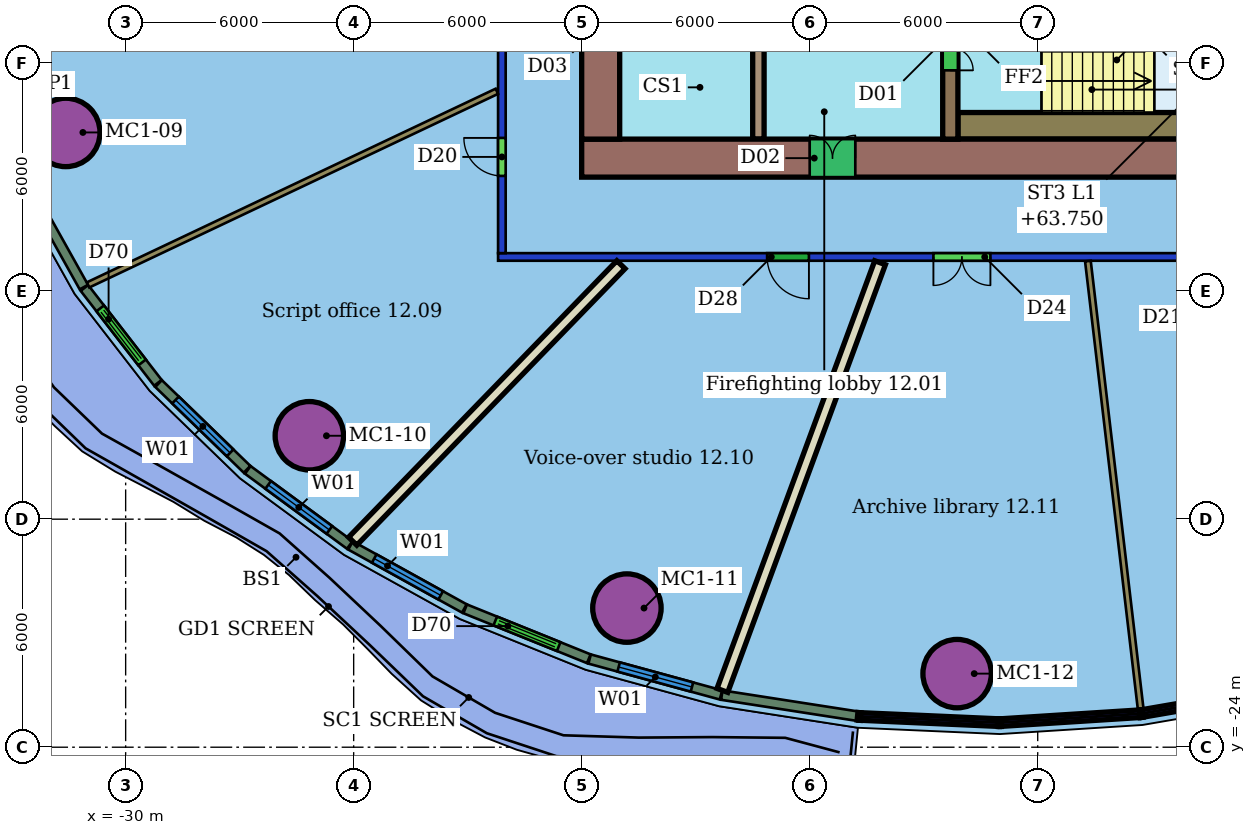
"""IFC4 building model, lengths in metres.
Left out: names, types, materials, properties, quantities, classifications, styles, units other than length and angle.
Written with IfcOpenShell. Run it as: python <this file> out.ifc"""

import sys

from ifc_helpers import new_model, si_unit, direction, frame, frame_2d, origin, origin_2d, place, context, subcontext, project, spatial, rectangle, hollow_circle, extrude, element, fill, save


model = new_model("IFC4")
c1 = context("Model", 3, precision=1e-05, world=origin(), true_north=direction((0.0, 1.0)))
c2 = subcontext(c1, "Body", "Model", "MODEL_VIEW")
j1 = project(units=[si_unit("LENGTHUNIT", "METRE"), si_unit("PLANEANGLEUNIT", "RADIAN")], contexts=[c1])
p1 = place(None, origin())
s1 = spatial("IfcSite", under=j1, at=p1, CompositionType="ELEMENT")
p2 = place(p1, origin())
s2 = spatial("IfcBuilding", under=s1, at=p2, CompositionType="ELEMENT")
p3 = place(p2, frame((0.0, 0.0, 61.9)))
s3 = spatial("IfcBuildingStorey", under=s2, at=p3, CompositionType="ELEMENT", Elevation=61.9)
for number, where, z_axis, x_axis in (
    (1, (-31.575, -7.824, 0.0), (0.0, 0.0, 1.0), (1.0, 0.0, 0.0)),
    (2, (-25.166, -15.805, 0.0), (0.0, 0.0, 1.0), (1.0, 0.0, 0.0)),
    (3, (-16.81, -20.339, 0.0), (0.0, 0.0, 1.0), (1.0, 0.0, 0.0)),
    (4, (-8.121, -22.064, 0.0), (0.0, 0.0, 1.0), (1.0, 0.0, 0.0)),
):
    element("IfcColumn", number, at=place(p3, frame(where, z_axis=z_axis, x_axis=x_axis)), inside=s3, PredefinedType="COLUMN", context=c2, shape_type="SweptSolid", body=[
        extrude(hollow_circle(Radius=0.9, WallThickness=0.06, at=origin_2d()), origin(), (0.0, 0.0, 1.0), 3.55),
    ])
p4 = place(p3, frame((8.2, -11.1, 0.0), z_axis=(0.0, 0.0, 1.0), x_axis=(-1.0, 0.0, 0.0)))
e5 = element("IfcWall", 5, at=p4, inside=s3, PredefinedType="PARTITIONING", context=c2, shape_type="SweptSolid", body=[
    extrude(rectangle(XDim=28.4, YDim=0.2, at=frame_2d((14.2, 0.0))), origin(), (0.0, 0.0, 1.0), 2.85),
])
p5 = place(p4, frame((20.22, 0.0, 0.0)))
e6 = element("IfcOpeningElement", 6, at=p5, cuts=e5, PredefinedType="OPENING", context=c2, shape_type="SweptSolid", body=[
    extrude(rectangle(XDim=1.1, YDim=2.1, at=frame_2d((0.55, 1.05))), frame((0.0, 0.11, 0.0), z_axis=(0.0, -1.0, 0.0), x_axis=(1.0, 0.0, 0.0)), (0.0, 0.0, 1.0), 0.22),
])
p6 = place(p4, frame((15.445, 0.0, 0.0)))
e7 = element("IfcOpeningElement", 7, at=p6, cuts=e5, PredefinedType="OPENING", context=c2, shape_type="SweptSolid", body=[
    extrude(rectangle(XDim=1.5, YDim=2.1, at=frame_2d((0.75, 1.05))), frame((0.0, 0.11, 0.0), z_axis=(0.0, -1.0, 0.0), x_axis=(1.0, 0.0, 0.0)), (0.0, 0.0, 1.0), 0.22),
])
p7 = place(p4, frame((7.586, 0.0, 0.0)))
e8 = element("IfcOpeningElement", 8, at=p7, cuts=e5, PredefinedType="OPENING", context=c2, shape_type="SweptSolid", body=[
    extrude(rectangle(XDim=1.8, YDim=2.1, at=frame_2d((0.9, 1.05))), frame((0.0, 0.11, 0.0), z_axis=(0.0, -1.0, 0.0), x_axis=(1.0, 0.0, 0.0)), (0.0, 0.0, 1.0), 0.22),
])
p8 = place(p3, frame((-20.1, -11.0, 0.0), z_axis=(0.0, 0.0, 1.0), x_axis=(0.0, 1.0, 0.0)))
e9 = element("IfcWall", 9, at=p8, inside=s3, PredefinedType="PARTITIONING", context=c2, shape_type="SweptSolid", body=[
    extrude(rectangle(XDim=22.0, YDim=0.2, at=frame_2d((11.0, 0.0))), origin(), (0.0, 0.0, 1.0), 2.85),
])
p9 = place(p8, frame((17.605, 0.0, 0.0)))
e10 = element("IfcOpeningElement", 10, at=p9, cuts=e9, PredefinedType="OPENING", context=c2, shape_type="SweptSolid", body=[
    extrude(rectangle(XDim=0.9, YDim=2.1, at=frame_2d((0.45, 1.05))), frame((0.0, 0.11, 0.0), z_axis=(0.0, -1.0, 0.0), x_axis=(1.0, 0.0, 0.0)), (0.0, 0.0, 1.0), 0.22),
])
p10 = place(p8, frame((13.3, 0.0, 0.0)))
e11 = element("IfcOpeningElement", 11, at=p10, cuts=e9, PredefinedType="OPENING", context=c2, shape_type="SweptSolid", body=[
    extrude(rectangle(XDim=1.1, YDim=2.1, at=frame_2d((0.55, 1.05))), frame((0.0, 0.11, 0.0), z_axis=(0.0, -1.0, 0.0), x_axis=(1.0, 0.0, 0.0)), (0.0, 0.0, 1.0), 0.22),
])
p11 = place(p8, frame((6.177, 0.0, 0.0)))
e12 = element("IfcOpeningElement", 12, at=p11, cuts=e9, PredefinedType="OPENING", context=c2, shape_type="SweptSolid", body=[
    extrude(rectangle(XDim=0.9, YDim=2.1, at=frame_2d((0.45, 1.05))), frame((0.0, 0.11, 0.0), z_axis=(0.0, -1.0, 0.0), x_axis=(1.0, 0.0, 0.0)), (0.0, 0.0, 1.0), 0.22),
])
p12 = place(p8, frame((2.032, 0.0, 0.0)))
e13 = element("IfcOpeningElement", 13, at=p12, cuts=e9, PredefinedType="OPENING", context=c2, shape_type="SweptSolid", body=[
    extrude(rectangle(XDim=1.0, YDim=2.1, at=frame_2d((0.5, 1.05))), frame((0.0, 0.11, 0.0), z_axis=(0.0, -1.0, 0.0), x_axis=(1.0, 0.0, 0.0)), (0.0, 0.0, 1.0), 0.22),
])
p13 = place(p3, frame((-30.989, -11.836, 0.0), z_axis=(0.0, 0.0, 1.0), x_axis=(0.903749950704, 0.428060774427, 0.0)))
e14 = element("IfcWall", 14, at=p13, inside=s3, PredefinedType="PARTITIONING", context=c2, shape_type="SweptSolid", body=[
    extrude(rectangle(XDim=11.902, YDim=0.15, at=frame_2d((5.951, 0.0))), origin(), (0.0, 0.0, 1.0), 3.55),
])
p14 = place(p3, frame((-24.025, -18.58, 0.0), z_axis=(0.0, 0.0, 1.0), x_axis=(0.696307194709, 0.717743889278, 0.0)))
e15 = element("IfcWall", 15, at=p14, inside=s3, PredefinedType="PARTITIONING", context=c2, shape_type="SweptSolid", body=[
    extrude(rectangle(XDim=10.136, YDim=0.3, at=frame_2d((5.068, 0.0))), origin(), (0.0, 0.0, 1.0), 3.55),
])
p15 = place(p3, frame((-14.297, -22.505, 0.0), z_axis=(0.0, 0.0, 1.0), x_axis=(0.345927029168, 0.938261419057, 0.0)))
e16 = element("IfcWall", 16, at=p15, inside=s3, PredefinedType="PARTITIONING", context=c2, shape_type="SweptSolid", body=[
    extrude(rectangle(XDim=11.994, YDim=0.3, at=frame_2d((5.997, 0.0))), origin(), (0.0, 0.0, 1.0), 3.55),
])
p16 = place(p3, frame((-3.291, -22.993, 0.0), z_axis=(0.0, 0.0, 1.0), x_axis=(-0.117014349032, 0.99313022415, 0.0)))
e17 = element("IfcWall", 17, at=p16, inside=s3, PredefinedType="PARTITIONING", context=c2, shape_type="SweptSolid", body=[
    extrude(rectangle(XDim=11.865, YDim=0.15, at=frame_2d((5.933, 0.0))), origin(), (0.0, 0.0, 1.0), 3.55),
])
p17 = place(p3, frame((-32.587, -9.234, 0.0), z_axis=(0.0, 0.0, 1.0), x_axis=(0.488205617754, -0.872728637547, 0.0)))
e18 = element("IfcWall", 18, at=p17, inside=s3, PredefinedType="SOLIDWALL", context=c2, shape_type="SweptSolid", body=[
    extrude(rectangle(XDim=3.047, YDim=0.25, at=frame_2d((1.523, 0.0))), origin(), (0.0, 0.0, 1.0), 3.15),
])
p18 = place(p3, frame((-31.085, -11.916, 0.0), z_axis=(0.0, 0.0, 1.0), x_axis=(0.612382091745, -0.790561935404, 0.0)))
e19 = element("IfcWall", 19, at=p18, inside=s3, PredefinedType="SOLIDWALL", context=c2, shape_type="SweptSolid", body=[
    extrude(rectangle(XDim=3.158, YDim=0.25, at=frame_2d((1.579, 0.0))), origin(), (0.0, 0.0, 1.0), 3.15),
])
p19 = place(p18, frame((0.679, 0.0, 0.0)))
e20 = element("IfcOpeningElement", 20, at=p19, cuts=e19, PredefinedType="OPENING", context=c2, shape_type="SweptSolid", body=[
    extrude(rectangle(XDim=1.8, YDim=2.4, at=frame_2d((0.9, 1.2))), frame((0.0, 0.135, 0.0), z_axis=(0.0, -1.0, 0.0), x_axis=(1.0, 0.0, 0.0)), (0.0, 0.0, 1.0), 0.27),
])
p20 = place(p3, frame((-29.134, -14.432, 0.0), z_axis=(0.0, 0.0, 1.0), x_axis=(0.718313139299, -0.695719939279, 0.0)))
e21 = element("IfcWall", 21, at=p20, inside=s3, PredefinedType="SOLIDWALL", context=c2, shape_type="SweptSolid", body=[
    extrude(rectangle(XDim=3.242, YDim=0.25, at=frame_2d((1.621, 0.0))), origin(), (0.0, 0.0, 1.0), 3.15),
])
p21 = place(p20, frame((0.621, 0.0, 0.8)))
e22 = element("IfcOpeningElement", 22, at=p21, cuts=e21, PredefinedType="OPENING", context=c2, shape_type="SweptSolid", body=[
    extrude(rectangle(XDim=2.0, YDim=2.2, at=frame_2d((1.0, 1.1))), frame((0.0, 0.135, 0.0), z_axis=(0.0, -1.0, 0.0), x_axis=(1.0, 0.0, 0.0)), (0.0, 0.0, 1.0), 0.27),
])
p22 = place(p3, frame((-26.786, -16.703, 0.0), z_axis=(0.0, 0.0, 1.0), x_axis=(0.80553067299, -0.592554077594, 0.0)))
e23 = element("IfcWall", 23, at=p22, inside=s3, PredefinedType="SOLIDWALL", context=c2, shape_type="SweptSolid", body=[
    extrude(rectangle(XDim=3.332, YDim=0.25, at=frame_2d((1.666, 0.0))), origin(), (0.0, 0.0, 1.0), 3.15),
])
p23 = place(p22, frame((0.666, 0.0, 0.8)))
e24 = element("IfcOpeningElement", 24, at=p23, cuts=e23, PredefinedType="OPENING", context=c2, shape_type="SweptSolid", body=[
    extrude(rectangle(XDim=2.0, YDim=2.2, at=frame_2d((1.0, 1.1))), frame((0.0, 0.135, 0.0), z_axis=(0.0, -1.0, 0.0), x_axis=(1.0, 0.0, 0.0)), (0.0, 0.0, 1.0), 0.27),
])
p24 = place(p3, frame((-24.082, -18.691, 0.0), z_axis=(0.0, 0.0, 1.0), x_axis=(0.874758800171, -0.48455860484, 0.0)))
e25 = element("IfcWall", 25, at=p24, inside=s3, PredefinedType="SOLIDWALL", context=c2, shape_type="SweptSolid", body=[
    extrude(rectangle(XDim=3.423, YDim=0.25, at=frame_2d((1.711, 0.0))), origin(), (0.0, 0.0, 1.0), 3.15),
])
p25 = place(p24, frame((0.712, 0.0, 0.8)))
e26 = element("IfcOpeningElement", 26, at=p25, cuts=e25, PredefinedType="OPENING", context=c2, shape_type="SweptSolid", body=[
    extrude(rectangle(XDim=2.0, YDim=2.2, at=frame_2d((1.0, 1.1))), frame((0.0, 0.135, 0.0), z_axis=(0.0, -1.0, 0.0), x_axis=(1.0, 0.0, 0.0)), (0.0, 0.0, 1.0), 0.27),
])
p26 = place(p3, frame((-21.066, -20.359, 0.0), z_axis=(0.0, 0.0, 1.0), x_axis=(0.927325439412, -0.374255967782, 0.0)))
e27 = element("IfcWall", 27, at=p26, inside=s3, PredefinedType="SOLIDWALL", context=c2, shape_type="SweptSolid", body=[
    extrude(rectangle(XDim=3.509, YDim=0.25, at=frame_2d((1.754, 0.0))), origin(), (0.0, 0.0, 1.0), 3.15),
])
p27 = place(p26, frame((0.854, 0.0, 0.0)))
e28 = element("IfcOpeningElement", 28, at=p27, cuts=e27, PredefinedType="OPENING", context=c2, shape_type="SweptSolid", body=[
    extrude(rectangle(XDim=1.8, YDim=2.4, at=frame_2d((0.9, 1.2))), frame((0.0, 0.135, 0.0), z_axis=(0.0, -1.0, 0.0), x_axis=(1.0, 0.0, 0.0)), (0.0, 0.0, 1.0), 0.27),
])
p28 = place(p3, frame((-17.791, -21.68, 0.0), z_axis=(0.0, 0.0, 1.0), x_axis=(0.964644250164, -0.263555441274, 0.0)))
e29 = element("IfcWall", 29, at=p28, inside=s3, PredefinedType="SOLIDWALL", context=c2, shape_type="SweptSolid", body=[
    extrude(rectangle(XDim=3.584, YDim=0.25, at=frame_2d((1.792, 0.0))), origin(), (0.0, 0.0, 1.0), 3.15),
])
p29 = place(p28, frame((0.792, 0.0, 0.8)))
e30 = element("IfcOpeningElement", 30, at=p29, cuts=e29, PredefinedType="OPENING", context=c2, shape_type="SweptSolid", body=[
    extrude(rectangle(XDim=2.0, YDim=2.2, at=frame_2d((1.0, 1.1))), frame((0.0, 0.135, 0.0), z_axis=(0.0, -1.0, 0.0), x_axis=(1.0, 0.0, 0.0)), (0.0, 0.0, 1.0), 0.27),
])
p30 = place(p3, frame((-14.312, -22.629, 0.0), z_axis=(0.0, 0.0, 1.0), x_axis=(0.98816220641, -0.153412691208, 0.0)))
e31 = element("IfcWall", 31, at=p30, inside=s3, PredefinedType="SOLIDWALL", context=c2, shape_type="SweptSolid", body=[
    extrude(rectangle(XDim=3.6, YDim=0.25, at=frame_2d((1.8, 0.0))), origin(), (0.0, 0.0, 1.0), 3.15),
])
p31 = place(p3, frame((-18.0, -8.5, 0.0), z_axis=(0.0, 0.0, 1.0), x_axis=(1.0, 0.0, 0.0)))
e32 = element("IfcWall", 32, at=p31, inside=s3, PredefinedType="SHEAR", context=c2, shape_type="SweptSolid", body=[
    extrude(rectangle(XDim=24.0, YDim=1.0, at=frame_2d((12.0, 0.0))), origin(), (0.0, 0.0, 1.0), 3.4),
])
p32 = place(p31, frame((6.0, 0.0, 0.0)))
e33 = element("IfcOpeningElement", 33, at=p32, cuts=e32, PredefinedType="OPENING", context=c2, shape_type="SweptSolid", body=[
    extrude(rectangle(XDim=1.2, YDim=2.1, at=frame_2d((0.6, 1.05))), frame((0.0, 0.51, 0.0), z_axis=(0.0, -1.0, 0.0), x_axis=(1.0, 0.0, 0.0)), (0.0, 0.0, 1.0), 1.02),
])
p33 = place(p3, frame((-17.5, 8.0, 0.0), z_axis=(0.0, 0.0, 1.0), x_axis=(0.0, -1.0, 0.0)))
e34 = element("IfcWall", 34, at=p33, inside=s3, PredefinedType="SHEAR", context=c2, shape_type="SweptSolid", body=[
    extrude(rectangle(XDim=16.0, YDim=1.0, at=frame_2d((8.0, 0.0))), origin(), (0.0, 0.0, 1.0), 3.4),
])
p34 = place(p33, frame((11.9, 0.0, 0.0)))
e35 = element("IfcOpeningElement", 35, at=p34, cuts=e34, PredefinedType="OPENING", context=c2, shape_type="SweptSolid", body=[
    extrude(rectangle(XDim=1.2, YDim=2.1, at=frame_2d((0.6, 1.05))), frame((0.0, 0.51, 0.0), z_axis=(0.0, -1.0, 0.0), x_axis=(1.0, 0.0, 0.0)), (0.0, 0.0, 1.0), 1.02),
])
p35 = place(p33, frame((2.9, 0.0, 0.0)))
e36 = element("IfcOpeningElement", 36, at=p35, cuts=e34, PredefinedType="OPENING", context=c2, shape_type="SweptSolid", body=[
    extrude(rectangle(XDim=1.2, YDim=2.1, at=frame_2d((0.6, 1.05))), frame((0.0, 0.51, 0.0), z_axis=(0.0, -1.0, 0.0), x_axis=(1.0, 0.0, 0.0)), (0.0, 0.0, 1.0), 1.02),
])
p36 = place(p3, frame((-13.35, 8.0, 0.0), z_axis=(0.0, 0.0, 1.0), x_axis=(0.0, -1.0, 0.0)))
e37 = element("IfcWall", 37, at=p36, inside=s3, PredefinedType="SHEAR", context=c2, shape_type="SweptSolid", body=[
    extrude(rectangle(XDim=16.0, YDim=0.3, at=frame_2d((8.0, 0.0))), origin(), (0.0, 0.0, 1.0), 3.4),
])
p37 = place(p36, frame((7.25, 0.0, 0.0)))
e38 = element("IfcOpeningElement", 38, at=p37, cuts=e37, PredefinedType="OPENING", context=c2, shape_type="SweptSolid", body=[
    extrude(rectangle(XDim=1.5, YDim=2.1, at=frame_2d((0.75, 1.05))), frame((0.0, 0.16, 0.0), z_axis=(0.0, -1.0, 0.0), x_axis=(1.0, 0.0, 0.0)), (0.0, 0.0, 1.0), 0.32),
])
p38 = place(p3, frame((-8.3, -3.88, 0.0), z_axis=(0.0, 0.0, 1.0), x_axis=(0.0, -1.0, 0.0)))
e39 = element("IfcWall", 39, at=p38, inside=s3, PredefinedType="SHEAR", context=c2, shape_type="SweptSolid", body=[
    extrude(rectangle(XDim=4.12, YDim=0.4, at=frame_2d((2.06, 0.0))), origin(), (0.0, 0.0, 1.0), 3.4),
])
p39 = place(p38, frame((1.11, 0.0, 0.0)))
e40 = element("IfcOpeningElement", 40, at=p39, cuts=e39, PredefinedType="OPENING", context=c2, shape_type="SweptSolid", body=[
    extrude(rectangle(XDim=1.2, YDim=2.1, at=frame_2d((0.6, 1.05))), frame((0.0, 0.21, 0.0), z_axis=(0.0, -1.0, 0.0), x_axis=(1.0, 0.0, 0.0)), (0.0, 0.0, 1.0), 0.42),
])
p40 = place(p3, frame((-8.1, -7.65, 0.0), z_axis=(0.0, 0.0, 1.0), x_axis=(1.0, 0.0, 0.0)))
e41 = element("IfcWall", 41, at=p40, inside=s3, PredefinedType="SHEAR", context=c2, shape_type="SweptSolid", body=[
    extrude(rectangle(XDim=7.05, YDim=0.7, at=frame_2d((3.525, 0.0))), origin(), (0.0, 0.0, 1.0), 3.4),
])
p41 = place(p12, origin())
e42 = element("IfcDoor", 42, at=p41, inside=s3, OperationType="SINGLE_SWING_RIGHT", PredefinedType="DOOR", context=c2, shape_type="SweptSolid", body=[
    extrude(rectangle(XDim=1.0, YDim=2.1, at=frame_2d((0.5, 1.05))), frame((0.0, 0.025, 0.0), z_axis=(0.0, -1.0, 0.0), x_axis=(1.0, 0.0, 0.0)), (0.0, 0.0, 1.0), 0.05),
])
fill(e13, e42)
p42 = place(p5, origin())
e43 = element("IfcDoor", 43, at=p42, inside=s3, OperationType="SINGLE_SWING_LEFT", PredefinedType="DOOR", context=c2, shape_type="SweptSolid", body=[
    extrude(rectangle(XDim=1.1, YDim=2.1, at=frame_2d((0.55, 1.05))), frame((0.0, 0.025, 0.0), z_axis=(0.0, -1.0, 0.0), x_axis=(1.0, 0.0, 0.0)), (0.0, 0.0, 1.0), 0.05),
])
fill(e6, e43)
p43 = place(p6, origin())
e44 = element("IfcDoor", 44, at=p43, inside=s3, OperationType="DOUBLE_DOOR_SINGLE_SWING", PredefinedType="DOOR", context=c2, shape_type="SweptSolid", body=[
    extrude(rectangle(XDim=1.5, YDim=2.1, at=frame_2d((0.75, 1.05))), frame((0.0, 0.025, 0.0), z_axis=(0.0, -1.0, 0.0), x_axis=(1.0, 0.0, 0.0)), (0.0, 0.0, 1.0), 0.05),
])
fill(e7, e44)
p44 = place(p19, origin())
e45 = element("IfcDoor", 45, at=p44, inside=s3, OperationType="DOUBLE_DOOR_SLIDING", PredefinedType="DOOR", context=c2, shape_type="SweptSolid", body=[
    extrude(rectangle(XDim=1.8, YDim=2.4, at=frame_2d((0.9, 1.2))), frame((0.0, 0.025, 0.0), z_axis=(0.0, -1.0, 0.0), x_axis=(1.0, 0.0, 0.0)), (0.0, 0.0, 1.0), 0.05),
])
fill(e20, e45)
p45 = place(p21, origin())
e46 = element("IfcWindow", 46, at=p45, inside=s3, PartitioningType="SINGLE_PANEL", PredefinedType="WINDOW", context=c2, shape_type="SweptSolid", body=[
    extrude(rectangle(XDim=2.0, YDim=2.2, at=frame_2d((1.0, 1.1))), frame((0.0, 0.03, 0.0), z_axis=(0.0, -1.0, 0.0), x_axis=(1.0, 0.0, 0.0)), (0.0, 0.0, 1.0), 0.06),
])
fill(e22, e46)
p46 = place(p23, origin())
e47 = element("IfcWindow", 47, at=p46, inside=s3, PartitioningType="SINGLE_PANEL", PredefinedType="WINDOW", context=c2, shape_type="SweptSolid", body=[
    extrude(rectangle(XDim=2.0, YDim=2.2, at=frame_2d((1.0, 1.1))), frame((0.0, 0.03, 0.0), z_axis=(0.0, -1.0, 0.0), x_axis=(1.0, 0.0, 0.0)), (0.0, 0.0, 1.0), 0.06),
])
fill(e24, e47)
p47 = place(p25, origin())
e48 = element("IfcWindow", 48, at=p47, inside=s3, PartitioningType="SINGLE_PANEL", PredefinedType="WINDOW", context=c2, shape_type="SweptSolid", body=[
    extrude(rectangle(XDim=2.0, YDim=2.2, at=frame_2d((1.0, 1.1))), frame((0.0, 0.03, 0.0), z_axis=(0.0, -1.0, 0.0), x_axis=(1.0, 0.0, 0.0)), (0.0, 0.0, 1.0), 0.06),
])
fill(e26, e48)
p48 = place(p27, origin())
e49 = element("IfcDoor", 49, at=p48, inside=s3, OperationType="DOUBLE_DOOR_SLIDING", PredefinedType="DOOR", context=c2, shape_type="SweptSolid", body=[
    extrude(rectangle(XDim=1.8, YDim=2.4, at=frame_2d((0.9, 1.2))), frame((0.0, 0.025, 0.0), z_axis=(0.0, -1.0, 0.0), x_axis=(1.0, 0.0, 0.0)), (0.0, 0.0, 1.0), 0.05),
])
fill(e28, e49)
p49 = place(p29, origin())
e50 = element("IfcWindow", 50, at=p49, inside=s3, PartitioningType="SINGLE_PANEL", PredefinedType="WINDOW", context=c2, shape_type="SweptSolid", body=[
    extrude(rectangle(XDim=2.0, YDim=2.2, at=frame_2d((1.0, 1.1))), frame((0.0, 0.03, 0.0), z_axis=(0.0, -1.0, 0.0), x_axis=(1.0, 0.0, 0.0)), (0.0, 0.0, 1.0), 0.06),
])
fill(e30, e50)
p50 = place(p32, origin())
e51 = element("IfcDoor", 51, at=p50, inside=s3, OperationType="DOUBLE_DOOR_SINGLE_SWING", PredefinedType="NOTDEFINED", context=c2, shape_type="SweptSolid", body=[
    extrude(rectangle(XDim=1.2, YDim=2.1, at=frame_2d((0.6, 1.05))), frame((0.0, 0.025, 0.0), z_axis=(0.0, -1.0, 0.0), x_axis=(1.0, 0.0, 0.0)), (0.0, 0.0, 1.0), 0.05),
])
fill(e33, e51)
p51 = place(p39, origin())
e52 = element("IfcDoor", 52, at=p51, inside=s3, OperationType="DOUBLE_DOOR_SINGLE_SWING", PredefinedType="NOTDEFINED", context=c2, shape_type="SweptSolid", body=[
    extrude(rectangle(XDim=1.2, YDim=2.1, at=frame_2d((0.6, 1.05))), frame((0.0, 0.025, 0.0), z_axis=(0.0, -1.0, 0.0), x_axis=(1.0, 0.0, 0.0)), (0.0, 0.0, 1.0), 0.05),
])
fill(e40, e52)
save(model, sys.argv[1])
